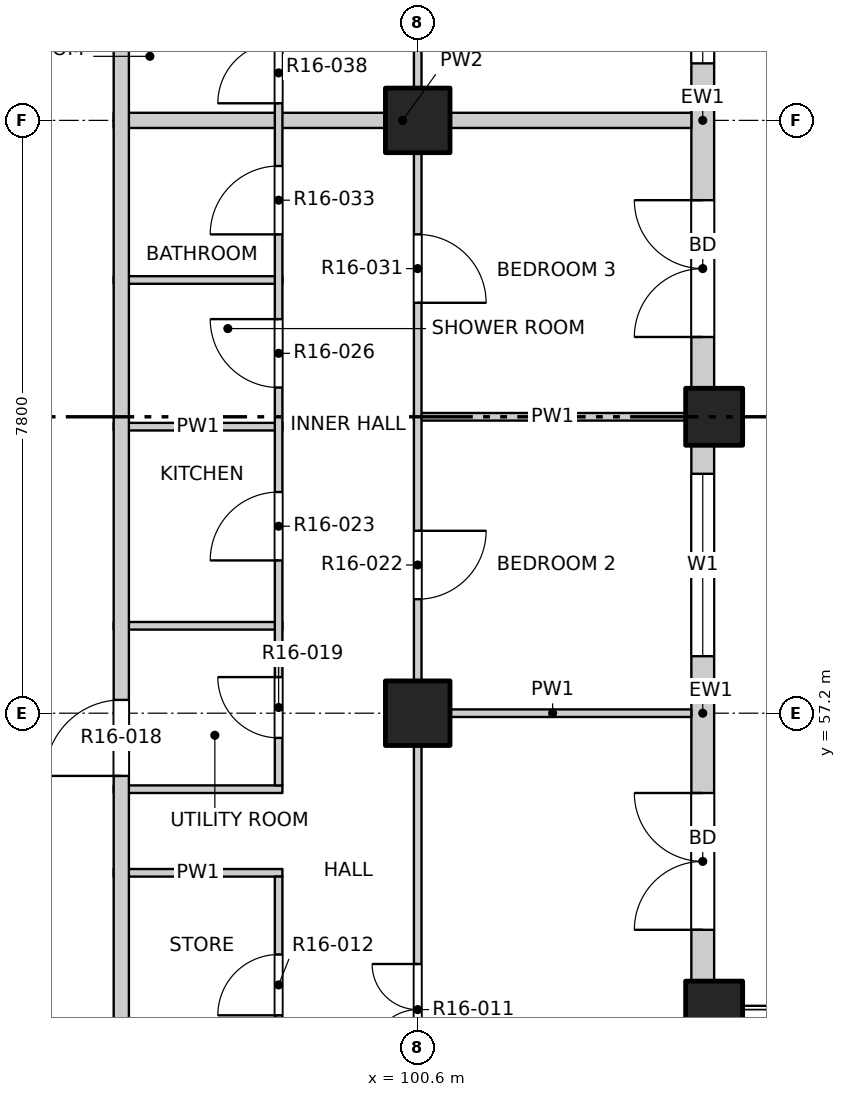
"""IFC4 building model, lengths in metres.
Left out: names, types, materials, properties, quantities, classifications, styles, units other than length and angle.
Written with IfcOpenShell. Run it as: python <this file> out.ifc"""

import sys

from ifc_helpers import new_model, si_unit, direction, frame, frame_2d, origin, origin_2d, place, context, subcontext, project, spatial, rectangle, extrude, element, fill, save


model = new_model("IFC4")
c1 = context("Model", 3, precision=1e-05, world=origin(), true_north=direction((0.0, 1.0)))
c2 = subcontext(c1, "Body", "Model", "MODEL_VIEW")
j1 = project(units=[si_unit("LENGTHUNIT", "METRE"), si_unit("PLANEANGLEUNIT", "RADIAN")], contexts=[c1])
p1 = place(None, origin())
s1 = spatial("IfcSite", under=j1, at=p1, CompositionType="ELEMENT")
p2 = place(p1, origin())
s2 = spatial("IfcBuilding", under=s1, at=p2, CompositionType="ELEMENT")
p3 = place(p2, frame((0.0, 0.0, 169.0)))
s3 = spatial("IfcBuildingStorey", under=s2, at=p3, CompositionType="ELEMENT", Elevation=169.0)
for number, where, z_axis, x_axis in (
    (1, (104.5, 53.3, -0.25), (0.0, 0.0, 1.0), (1.0, 0.0, 0.0)),
    (2, (104.5, 61.1, -0.25), (0.0, 0.0, 1.0), (1.0, 0.0, 0.0)),
):
    element("IfcColumn", number, at=place(p3, frame(where, z_axis=z_axis, x_axis=x_axis)), inside=s3, PredefinedType="COLUMN", context=c2, shape_type="SweptSolid", body=[
        extrude(rectangle(XDim=0.75, YDim=0.75, at=origin_2d()), origin(), (0.0, 0.0, 1.0), 3.35),
    ])
for number, where, z_axis, x_axis in (
    (3, (100.6, 57.2, -0.25), (0.0, 0.0, 1.0), (1.0, 0.0, 0.0)),
    (4, (100.6, 65.0, -0.25), (0.0, 0.0, 1.0), (1.0, 0.0, 0.0)),
):
    element("IfcColumn", number, at=place(p3, frame(where, z_axis=z_axis, x_axis=x_axis)), inside=s3, PredefinedType="COLUMN", context=c2, shape_type="SweptSolid", body=[
        extrude(rectangle(XDim=0.85, YDim=0.85, at=origin_2d()), origin(), (0.0, 0.0, 1.0), 3.35),
    ])
p4 = place(p3, frame((104.35, 53.675, 0.0), z_axis=(0.0, 0.0, 1.0), x_axis=(0.0, 1.0, 0.0)))
e5 = element("IfcWall", 5, at=p4, inside=s3, PredefinedType="SOLIDWALL", context=c2, shape_type="SweptSolid", body=[
    extrude(rectangle(XDim=7.05, YDim=0.3, at=frame_2d((3.525, 0.0))), origin(), (0.0, 0.0, 1.0), 3.1),
])
p5 = place(p4, frame((0.675, 0.0, 0.0)))
e6 = element("IfcOpeningElement", 6, at=p5, cuts=e5, PredefinedType="OPENING", context=c2, shape_type="SweptSolid", body=[
    extrude(rectangle(XDim=1.8, YDim=2.4, at=frame_2d((0.9, 1.2))), frame((0.0, 0.16, 0.0), z_axis=(0.0, -1.0, 0.0), x_axis=(1.0, 0.0, 0.0)), (0.0, 0.0, 1.0), 0.32),
])
p6 = place(p4, frame((4.275, 0.0, 0.9)))
e7 = element("IfcOpeningElement", 7, at=p6, cuts=e5, PredefinedType="OPENING", context=c2, shape_type="SweptSolid", body=[
    extrude(rectangle(XDim=2.4, YDim=1.8, at=frame_2d((1.2, 0.9))), frame((0.0, 0.16, 0.0), z_axis=(0.0, -1.0, 0.0), x_axis=(1.0, 0.0, 0.0)), (0.0, 0.0, 1.0), 0.32),
])
p7 = place(p3, frame((104.35, 61.475, 0.0), z_axis=(0.0, 0.0, 1.0), x_axis=(0.0, 1.0, 0.0)))
e8 = element("IfcWall", 8, at=p7, inside=s3, PredefinedType="SOLIDWALL", context=c2, shape_type="SweptSolid", body=[
    extrude(rectangle(XDim=7.05, YDim=0.3, at=frame_2d((3.525, 0.0))), origin(), (0.0, 0.0, 1.0), 3.1),
])
p8 = place(p7, frame((0.675, 0.0, 0.0)))
e9 = element("IfcOpeningElement", 9, at=p8, cuts=e8, PredefinedType="OPENING", context=c2, shape_type="SweptSolid", body=[
    extrude(rectangle(XDim=1.8, YDim=2.4, at=frame_2d((0.9, 1.2))), frame((0.0, 0.16, 0.0), z_axis=(0.0, -1.0, 0.0), x_axis=(1.0, 0.0, 0.0)), (0.0, 0.0, 1.0), 0.32),
])
p9 = place(p7, frame((4.275, 0.0, 0.9)))
e10 = element("IfcOpeningElement", 10, at=p9, cuts=e8, PredefinedType="OPENING", context=c2, shape_type="SweptSolid", body=[
    extrude(rectangle(XDim=2.4, YDim=1.8, at=frame_2d((1.2, 0.9))), frame((0.0, 0.16, 0.0), z_axis=(0.0, -1.0, 0.0), x_axis=(1.0, 0.0, 0.0)), (0.0, 0.0, 1.0), 0.32),
])
for number, where, z_axis, x_axis in (
    (11, (96.6, 55.1, 0.0), (0.0, 0.0, 1.0), (1.0, 0.0, 0.0)),
    (12, (96.6, 56.2, 0.0), (0.0, 0.0, 1.0), (1.0, 0.0, 0.0)),
):
    element("IfcWall", number, at=place(p3, frame(where, z_axis=z_axis, x_axis=x_axis)), inside=s3, PredefinedType="PARTITIONING", context=c2, shape_type="SweptSolid", body=[
        extrude(rectangle(XDim=2.22, YDim=0.1, at=frame_2d((1.11, 0.0))), origin(), (0.0, 0.0, 1.0), 3.1),
    ])
p10 = place(p3, frame((100.55, 57.2, 0.0), z_axis=(0.0, 0.0, 1.0), x_axis=(1.0, 0.0, 0.0)))
e13 = element("IfcWall", 13, at=p10, inside=s3, PredefinedType="PARTITIONING", context=c2, shape_type="SweptSolid", body=[
    extrude(rectangle(XDim=3.65, YDim=0.1, at=frame_2d((1.825, 0.0))), origin(), (0.0, 0.0, 1.0), 3.1),
])
for number, where, z_axis, x_axis in (
    (14, (96.6, 58.35, 0.0), (0.0, 0.0, 1.0), (1.0, 0.0, 0.0)),
    (15, (96.6, 60.97, 0.0), (0.0, 0.0, 1.0), (1.0, 0.0, 0.0)),
):
    element("IfcWall", number, at=place(p3, frame(where, z_axis=z_axis, x_axis=x_axis)), inside=s3, PredefinedType="PARTITIONING", context=c2, shape_type="SweptSolid", body=[
        extrude(rectangle(XDim=2.22, YDim=0.1, at=frame_2d((1.11, 0.0))), origin(), (0.0, 0.0, 1.0), 3.1),
    ])
p11 = place(p3, frame((100.55, 61.1, 0.0), z_axis=(0.0, 0.0, 1.0), x_axis=(1.0, 0.0, 0.0)))
e16 = element("IfcWall", 16, at=p11, inside=s3, PredefinedType="PARTITIONING", context=c2, shape_type="SweptSolid", body=[
    extrude(rectangle(XDim=3.65, YDim=0.1, at=frame_2d((1.825, 0.0))), origin(), (0.0, 0.0, 1.0), 3.1),
])
p12 = place(p3, frame((96.6, 62.9, 0.0), z_axis=(0.0, 0.0, 1.0), x_axis=(1.0, 0.0, 0.0)))
e17 = element("IfcWall", 17, at=p12, inside=s3, PredefinedType="PARTITIONING", context=c2, shape_type="SweptSolid", body=[
    extrude(rectangle(XDim=2.22, YDim=0.1, at=frame_2d((1.11, 0.0))), origin(), (0.0, 0.0, 1.0), 3.1),
])
p13 = place(p3, frame((96.6, 65.0, 0.0), z_axis=(0.0, 0.0, 1.0), x_axis=(1.0, 0.0, 0.0)))
e18 = element("IfcWall", 18, at=p13, inside=s3, PredefinedType="PARTITIONING", context=c2, shape_type="SweptSolid", body=[
    extrude(rectangle(XDim=7.6, YDim=0.2, at=frame_2d((3.8, 0.0))), origin(), (0.0, 0.0, 1.0), 3.1),
])
p14 = place(p3, frame((96.7, 49.5, 0.0), z_axis=(0.0, 0.0, 1.0), x_axis=(0.0, 1.0, 0.0)))
e19 = element("IfcWall", 19, at=p14, inside=s3, PredefinedType="PARTITIONING", context=c2, shape_type="SweptSolid", body=[
    extrude(rectangle(XDim=34.7, YDim=0.2, at=frame_2d((17.35, 0.0))), origin(), (0.0, 0.0, 1.0), 3.1),
])
p15 = place(p14, frame((6.875, 0.0, 0.0)))
e20 = element("IfcOpeningElement", 20, at=p15, cuts=e19, PredefinedType="OPENING", context=c2, shape_type="SweptSolid", body=[
    extrude(rectangle(XDim=1.0, YDim=2.1, at=frame_2d((0.5, 1.05))), frame((0.0, 0.11, 0.0), z_axis=(0.0, -1.0, 0.0), x_axis=(1.0, 0.0, 0.0)), (0.0, 0.0, 1.0), 0.22),
])
p16 = place(p14, frame((18.025, 0.0, 0.0)))
e21 = element("IfcOpeningElement", 21, at=p16, cuts=e19, PredefinedType="OPENING", context=c2, shape_type="SweptSolid", body=[
    extrude(rectangle(XDim=1.0, YDim=2.1, at=frame_2d((0.5, 1.05))), frame((0.0, 0.11, 0.0), z_axis=(0.0, -1.0, 0.0), x_axis=(1.0, 0.0, 0.0)), (0.0, 0.0, 1.0), 0.22),
])
p17 = place(p3, frame((98.77, 49.45, 0.0), z_axis=(0.0, 0.0, 1.0), x_axis=(0.0, 1.0, 0.0)))
e22 = element("IfcWall", 22, at=p17, inside=s3, PredefinedType="PARTITIONING", context=c2, shape_type="SweptSolid", body=[
    extrude(rectangle(XDim=5.6, YDim=0.1, at=frame_2d((2.8, 0.0))), origin(), (0.0, 0.0, 1.0), 3.1),
])
p18 = place(p17, frame((0.925, 0.0, 0.0)))
e23 = element("IfcOpeningElement", 23, at=p18, cuts=e22, PredefinedType="OPENING", context=c2, shape_type="SweptSolid", body=[
    extrude(rectangle(XDim=0.8, YDim=2.1, at=frame_2d((0.4, 1.05))), frame((0.0, 0.06, 0.0), z_axis=(0.0, -1.0, 0.0), x_axis=(1.0, 0.0, 0.0)), (0.0, 0.0, 1.0), 0.12),
])
p19 = place(p17, frame((3.775, 0.0, 0.0)))
e24 = element("IfcOpeningElement", 24, at=p19, cuts=e22, PredefinedType="OPENING", context=c2, shape_type="SweptSolid", body=[
    extrude(rectangle(XDim=0.8, YDim=2.1, at=frame_2d((0.4, 1.05))), frame((0.0, 0.06, 0.0), z_axis=(0.0, -1.0, 0.0), x_axis=(1.0, 0.0, 0.0)), (0.0, 0.0, 1.0), 0.12),
])
p20 = place(p3, frame((98.77, 56.25, 0.0), z_axis=(0.0, 0.0, 1.0), x_axis=(0.0, 1.0, 0.0)))
e25 = element("IfcWall", 25, at=p20, inside=s3, PredefinedType="PARTITIONING", context=c2, shape_type="SweptSolid", body=[
    extrude(rectangle(XDim=9.95, YDim=0.1, at=frame_2d((4.975, 0.0))), origin(), (0.0, 0.0, 1.0), 3.1),
])
p21 = place(p20, frame((0.625, 0.0, 0.0)))
e26 = element("IfcOpeningElement", 26, at=p21, cuts=e25, PredefinedType="OPENING", context=c2, shape_type="SweptSolid", body=[
    extrude(rectangle(XDim=0.8, YDim=2.1, at=frame_2d((0.4, 1.05))), frame((0.0, 0.06, 0.0), z_axis=(0.0, -1.0, 0.0), x_axis=(1.0, 0.0, 0.0)), (0.0, 0.0, 1.0), 0.12),
])
p22 = place(p20, frame((2.96, 0.0, 0.0)))
e27 = element("IfcOpeningElement", 27, at=p22, cuts=e25, PredefinedType="OPENING", context=c2, shape_type="SweptSolid", body=[
    extrude(rectangle(XDim=0.9, YDim=2.1, at=frame_2d((0.45, 1.05))), frame((0.0, 0.06, 0.0), z_axis=(0.0, -1.0, 0.0), x_axis=(1.0, 0.0, 0.0)), (0.0, 0.0, 1.0), 0.12),
])
p23 = place(p20, frame((5.235, 0.0, 0.0)))
e28 = element("IfcOpeningElement", 28, at=p23, cuts=e25, PredefinedType="OPENING", context=c2, shape_type="SweptSolid", body=[
    extrude(rectangle(XDim=0.9, YDim=2.1, at=frame_2d((0.45, 1.05))), frame((0.0, 0.06, 0.0), z_axis=(0.0, -1.0, 0.0), x_axis=(1.0, 0.0, 0.0)), (0.0, 0.0, 1.0), 0.12),
])
p24 = place(p20, frame((7.25, 0.0, 0.0)))
e29 = element("IfcOpeningElement", 29, at=p24, cuts=e25, PredefinedType="OPENING", context=c2, shape_type="SweptSolid", body=[
    extrude(rectangle(XDim=0.9, YDim=2.1, at=frame_2d((0.45, 1.05))), frame((0.0, 0.06, 0.0), z_axis=(0.0, -1.0, 0.0), x_axis=(1.0, 0.0, 0.0)), (0.0, 0.0, 1.0), 0.12),
])
p25 = place(p20, frame((8.975, 0.0, 0.0)))
e30 = element("IfcOpeningElement", 30, at=p25, cuts=e25, PredefinedType="OPENING", context=c2, shape_type="SweptSolid", body=[
    extrude(rectangle(XDim=0.8, YDim=2.1, at=frame_2d((0.4, 1.05))), frame((0.0, 0.06, 0.0), z_axis=(0.0, -1.0, 0.0), x_axis=(1.0, 0.0, 0.0)), (0.0, 0.0, 1.0), 0.12),
])
p26 = place(p3, frame((100.6, 45.8, 0.0), z_axis=(0.0, 0.0, 1.0), x_axis=(0.0, 1.0, 0.0)))
e31 = element("IfcWall", 31, at=p26, inside=s3, PredefinedType="PARTITIONING", context=c2, shape_type="SweptSolid", body=[
    extrude(rectangle(XDim=38.4, YDim=0.1, at=frame_2d((19.2, 0.0))), origin(), (0.0, 0.0, 1.0), 3.1),
])
p27 = place(p26, frame((1.05, 0.0, 0.0)))
e32 = element("IfcOpeningElement", 32, at=p27, cuts=e31, PredefinedType="OPENING", context=c2, shape_type="SweptSolid", body=[
    extrude(rectangle(XDim=1.2, YDim=2.1, at=frame_2d((0.6, 1.05))), frame((0.0, 0.06, 0.0), z_axis=(0.0, -1.0, 0.0), x_axis=(1.0, 0.0, 0.0)), (0.0, 0.0, 1.0), 0.12),
])
p28 = place(p26, frame((6.9, 0.0, 0.0)))
e33 = element("IfcOpeningElement", 33, at=p28, cuts=e31, PredefinedType="OPENING", context=c2, shape_type="SweptSolid", body=[
    extrude(rectangle(XDim=1.2, YDim=2.1, at=frame_2d((0.6, 1.05))), frame((0.0, 0.06, 0.0), z_axis=(0.0, -1.0, 0.0), x_axis=(1.0, 0.0, 0.0)), (0.0, 0.0, 1.0), 0.12),
])
p29 = place(p26, frame((12.9, 0.0, 0.0)))
e34 = element("IfcOpeningElement", 34, at=p29, cuts=e31, PredefinedType="OPENING", context=c2, shape_type="SweptSolid", body=[
    extrude(rectangle(XDim=0.9, YDim=2.1, at=frame_2d((0.45, 1.05))), frame((0.0, 0.06, 0.0), z_axis=(0.0, -1.0, 0.0), x_axis=(1.0, 0.0, 0.0)), (0.0, 0.0, 1.0), 0.12),
])
p30 = place(p26, frame((16.8, 0.0, 0.0)))
e35 = element("IfcOpeningElement", 35, at=p30, cuts=e31, PredefinedType="OPENING", context=c2, shape_type="SweptSolid", body=[
    extrude(rectangle(XDim=0.9, YDim=2.1, at=frame_2d((0.45, 1.05))), frame((0.0, 0.06, 0.0), z_axis=(0.0, -1.0, 0.0), x_axis=(1.0, 0.0, 0.0)), (0.0, 0.0, 1.0), 0.12),
])
p31 = place(p26, frame((20.7, 0.0, 0.0)))
e36 = element("IfcOpeningElement", 36, at=p31, cuts=e31, PredefinedType="OPENING", context=c2, shape_type="SweptSolid", body=[
    extrude(rectangle(XDim=0.9, YDim=2.1, at=frame_2d((0.45, 1.05))), frame((0.0, 0.06, 0.0), z_axis=(0.0, -1.0, 0.0), x_axis=(1.0, 0.0, 0.0)), (0.0, 0.0, 1.0), 0.12),
])
p32 = place(p26, frame((24.6, 0.0, 0.0)))
e37 = element("IfcOpeningElement", 37, at=p32, cuts=e31, PredefinedType="OPENING", context=c2, shape_type="SweptSolid", body=[
    extrude(rectangle(XDim=0.9, YDim=2.1, at=frame_2d((0.45, 1.05))), frame((0.0, 0.06, 0.0), z_axis=(0.0, -1.0, 0.0), x_axis=(1.0, 0.0, 0.0)), (0.0, 0.0, 1.0), 0.12),
])
p33 = place(p26, frame((28.5, 0.0, 0.0)))
e38 = element("IfcOpeningElement", 38, at=p33, cuts=e31, PredefinedType="OPENING", context=c2, shape_type="SweptSolid", body=[
    extrude(rectangle(XDim=0.9, YDim=2.1, at=frame_2d((0.45, 1.05))), frame((0.0, 0.06, 0.0), z_axis=(0.0, -1.0, 0.0), x_axis=(1.0, 0.0, 0.0)), (0.0, 0.0, 1.0), 0.12),
])
p34 = place(p26, frame((32.4, 0.0, 0.0)))
e39 = element("IfcOpeningElement", 39, at=p34, cuts=e31, PredefinedType="OPENING", context=c2, shape_type="SweptSolid", body=[
    extrude(rectangle(XDim=0.9, YDim=2.1, at=frame_2d((0.45, 1.05))), frame((0.0, 0.06, 0.0), z_axis=(0.0, -1.0, 0.0), x_axis=(1.0, 0.0, 0.0)), (0.0, 0.0, 1.0), 0.12),
])
p35 = place(p26, frame((36.15, 0.0, 0.0)))
e40 = element("IfcOpeningElement", 40, at=p35, cuts=e31, PredefinedType="OPENING", context=c2, shape_type="SweptSolid", body=[
    extrude(rectangle(XDim=1.2, YDim=2.1, at=frame_2d((0.6, 1.05))), frame((0.0, 0.06, 0.0), z_axis=(0.0, -1.0, 0.0), x_axis=(1.0, 0.0, 0.0)), (0.0, 0.0, 1.0), 0.12),
])
p36 = place(p5, origin())
e41 = element("IfcDoor", 41, at=p36, inside=s3, OperationType="DOUBLE_DOOR_SINGLE_SWING", PredefinedType="DOOR", context=c2, shape_type="SweptSolid", body=[
    extrude(rectangle(XDim=1.8, YDim=2.4, at=frame_2d((0.9, 1.2))), frame((0.0, 0.025, 0.0), z_axis=(0.0, -1.0, 0.0), x_axis=(1.0, 0.0, 0.0)), (0.0, 0.0, 1.0), 0.05),
])
fill(e6, e41)
p37 = place(p6, origin())
e42 = element("IfcWindow", 42, at=p37, inside=s3, PartitioningType="DOUBLE_PANEL_VERTICAL", PredefinedType="WINDOW", context=c2, shape_type="SweptSolid", body=[
    extrude(rectangle(XDim=2.4, YDim=1.8, at=frame_2d((1.2, 0.9))), frame((0.0, 0.03, 0.0), z_axis=(0.0, -1.0, 0.0), x_axis=(1.0, 0.0, 0.0)), (0.0, 0.0, 1.0), 0.06),
])
fill(e7, e42)
p38 = place(p8, origin())
e43 = element("IfcDoor", 43, at=p38, inside=s3, OperationType="DOUBLE_DOOR_SINGLE_SWING", PredefinedType="DOOR", context=c2, shape_type="SweptSolid", body=[
    extrude(rectangle(XDim=1.8, YDim=2.4, at=frame_2d((0.9, 1.2))), frame((0.0, 0.025, 0.0), z_axis=(0.0, -1.0, 0.0), x_axis=(1.0, 0.0, 0.0)), (0.0, 0.0, 1.0), 0.05),
])
fill(e9, e43)
p39 = place(p9, origin())
e44 = element("IfcWindow", 44, at=p39, inside=s3, PartitioningType="DOUBLE_PANEL_VERTICAL", PredefinedType="WINDOW", context=c2, shape_type="SweptSolid", body=[
    extrude(rectangle(XDim=2.4, YDim=1.8, at=frame_2d((1.2, 0.9))), frame((0.0, 0.03, 0.0), z_axis=(0.0, -1.0, 0.0), x_axis=(1.0, 0.0, 0.0)), (0.0, 0.0, 1.0), 0.06),
])
fill(e10, e44)
p40 = place(p28, origin())
e45 = element("IfcDoor", 45, at=p40, inside=s3, OperationType="DOUBLE_DOOR_SINGLE_SWING", PredefinedType="DOOR", context=c2, shape_type="SweptSolid", body=[
    extrude(rectangle(XDim=1.2, YDim=2.1, at=frame_2d((0.6, 1.05))), frame((0.0, 0.025, 0.0), z_axis=(0.0, -1.0, 0.0), x_axis=(1.0, 0.0, 0.0)), (0.0, 0.0, 1.0), 0.05),
])
fill(e33, e45)
p41 = place(p19, origin())
e46 = element("IfcDoor", 46, at=p41, inside=s3, OperationType="SINGLE_SWING_LEFT", PredefinedType="DOOR", context=c2, shape_type="SweptSolid", body=[
    extrude(rectangle(XDim=0.8, YDim=2.1, at=frame_2d((0.4, 1.05))), frame((0.0, 0.025, 0.0), z_axis=(0.0, -1.0, 0.0), x_axis=(1.0, 0.0, 0.0)), (0.0, 0.0, 1.0), 0.05),
])
fill(e24, e46)
p42 = place(p15, origin())
e47 = element("IfcDoor", 47, at=p42, inside=s3, OperationType="SINGLE_SWING_LEFT", PredefinedType="DOOR", context=c2, shape_type="SweptSolid", body=[
    extrude(rectangle(XDim=1.0, YDim=2.1, at=frame_2d((0.5, 1.05))), frame((0.0, 0.025, 0.0), z_axis=(0.0, -1.0, 0.0), x_axis=(1.0, 0.0, 0.0)), (0.0, 0.0, 1.0), 0.05),
])
fill(e20, e47)
p43 = place(p21, origin())
e48 = element("IfcDoor", 48, at=p43, inside=s3, OperationType="SINGLE_SWING_RIGHT", PredefinedType="DOOR", context=c2, shape_type="SweptSolid", body=[
    extrude(rectangle(XDim=0.8, YDim=2.1, at=frame_2d((0.4, 1.05))), frame((0.0, 0.025, 0.0), z_axis=(0.0, -1.0, 0.0), x_axis=(1.0, 0.0, 0.0)), (0.0, 0.0, 1.0), 0.05),
])
fill(e26, e48)
p44 = place(p29, origin())
e49 = element("IfcDoor", 49, at=p44, inside=s3, OperationType="SINGLE_SWING_LEFT", PredefinedType="DOOR", context=c2, shape_type="SweptSolid", body=[
    extrude(rectangle(XDim=0.9, YDim=2.1, at=frame_2d((0.45, 1.05))), frame((0.0, 0.025, 0.0), z_axis=(0.0, -1.0, 0.0), x_axis=(1.0, 0.0, 0.0)), (0.0, 0.0, 1.0), 0.05),
])
fill(e34, e49)
p45 = place(p22, origin())
e50 = element("IfcDoor", 50, at=p45, inside=s3, OperationType="SINGLE_SWING_LEFT", PredefinedType="DOOR", context=c2, shape_type="SweptSolid", body=[
    extrude(rectangle(XDim=0.9, YDim=2.1, at=frame_2d((0.45, 1.05))), frame((0.0, 0.025, 0.0), z_axis=(0.0, -1.0, 0.0), x_axis=(1.0, 0.0, 0.0)), (0.0, 0.0, 1.0), 0.05),
])
fill(e27, e50)
p46 = place(p23, origin())
e51 = element("IfcDoor", 51, at=p46, inside=s3, OperationType="SINGLE_SWING_RIGHT", PredefinedType="DOOR", context=c2, shape_type="SweptSolid", body=[
    extrude(rectangle(XDim=0.9, YDim=2.1, at=frame_2d((0.45, 1.05))), frame((0.0, 0.025, 0.0), z_axis=(0.0, -1.0, 0.0), x_axis=(1.0, 0.0, 0.0)), (0.0, 0.0, 1.0), 0.05),
])
fill(e28, e51)
p47 = place(p30, origin())
e52 = element("IfcDoor", 52, at=p47, inside=s3, OperationType="SINGLE_SWING_RIGHT", PredefinedType="DOOR", context=c2, shape_type="SweptSolid", body=[
    extrude(rectangle(XDim=0.9, YDim=2.1, at=frame_2d((0.45, 1.05))), frame((0.0, 0.025, 0.0), z_axis=(0.0, -1.0, 0.0), x_axis=(1.0, 0.0, 0.0)), (0.0, 0.0, 1.0), 0.05),
])
fill(e35, e52)
p48 = place(p24, origin())
e53 = element("IfcDoor", 53, at=p48, inside=s3, OperationType="SINGLE_SWING_LEFT", PredefinedType="DOOR", context=c2, shape_type="SweptSolid", body=[
    extrude(rectangle(XDim=0.9, YDim=2.1, at=frame_2d((0.45, 1.05))), frame((0.0, 0.025, 0.0), z_axis=(0.0, -1.0, 0.0), x_axis=(1.0, 0.0, 0.0)), (0.0, 0.0, 1.0), 0.05),
])
fill(e29, e53)
p49 = place(p25, origin())
e54 = element("IfcDoor", 54, at=p49, inside=s3, OperationType="SINGLE_SWING_LEFT", PredefinedType="DOOR", context=c2, shape_type="SweptSolid", body=[
    extrude(rectangle(XDim=0.8, YDim=2.1, at=frame_2d((0.4, 1.05))), frame((0.0, 0.025, 0.0), z_axis=(0.0, -1.0, 0.0), x_axis=(1.0, 0.0, 0.0)), (0.0, 0.0, 1.0), 0.05),
])
fill(e30, e54)
save(model, sys.argv[1])
